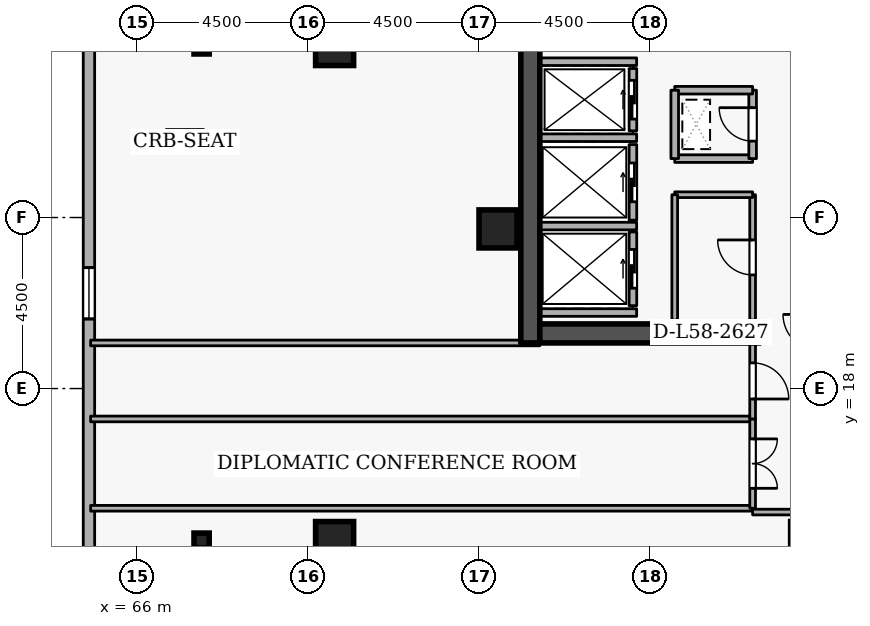
"""IFC4 building model, lengths in metres.
Left out: names, types, materials, properties, quantities, classifications, styles, units other than length and angle.
Written with IfcOpenShell. Run it as: python <this file> out.ifc"""

import sys

from ifc_helpers import new_model, si_unit, direction, frame, frame_2d, origin, origin_2d, place, context, subcontext, project, spatial, rectangle, i_section, extrude, element, fill, save


model = new_model("IFC4")
c1 = context("Model", 3, precision=1e-05, world=origin(), true_north=direction((0.0, 1.0)))
c2 = subcontext(c1, "Body", "Model", "MODEL_VIEW")
j1 = project(units=[si_unit("LENGTHUNIT", "METRE"), si_unit("PLANEANGLEUNIT", "RADIAN")], contexts=[c1])
p1 = place(None, origin())
s1 = spatial("IfcSite", under=j1, at=p1, CompositionType="ELEMENT")
p2 = place(p1, origin())
s2 = spatial("IfcBuilding", under=s1, at=p2, CompositionType="ELEMENT")
p3 = place(p2, frame((0.0, 0.0, 218.1)))
s3 = spatial("IfcBuildingStorey", under=s2, at=p3, CompositionType="ELEMENT", Elevation=218.1)
p4 = place(p3, frame((76.35, 19.2, 0.0), z_axis=(0.0, 0.0, 1.0), x_axis=(0.0, 1.0, 0.0)))
e1 = element("IfcWall", 1, at=p4, inside=s3, PredefinedType="SHEAR", context=c2, shape_type="SweptSolid", body=[
    extrude(rectangle(XDim=15.6, YDim=0.5, at=frame_2d((7.8, 0.0))), origin(), (0.0, 0.0, 1.0), 3.6),
])
p5 = place(p3, frame((76.6, 19.45, 0.0), z_axis=(0.0, 0.0, 1.0), x_axis=(1.0, 0.0, 0.0)))
e2 = element("IfcWall", 2, at=p5, inside=s3, PredefinedType="SHEAR", context=c2, shape_type="SweptSolid", body=[
    extrude(rectangle(XDim=5.8, YDim=0.5, at=frame_2d((2.9, 0.0))), origin(), (0.0, 0.0, 1.0), 3.6),
])
for number, where, z_axis, x_axis in (
    (3, (71.2, 14.0, 0.0), (0.0, 0.0, 1.0), (1.0, 0.0, 0.0)),
    (4, (71.2, 27.0, 0.0), (0.0, 0.0, 1.0), (1.0, 0.0, 0.0)),
    (5, (75.5, 22.2, 0.0), (0.0, 0.0, 1.0), (1.0, 0.0, 0.0)),
):
    element("IfcColumn", number, at=place(p3, frame(where, z_axis=z_axis, x_axis=x_axis)), inside=s3, PredefinedType="COLUMN", context=c2, shape_type="SweptSolid", body=[
        extrude(rectangle(XDim=1.0, YDim=1.0, at=origin_2d()), origin(), (0.0, 0.0, 1.0), 3.6),
    ])
for number, where, z_axis, x_axis in (
    (6, (67.7, 14.0, 0.0), (0.0, 0.0, 1.0), (1.0, 0.0, 0.0)),
    (7, (67.7, 27.0, 0.0), (0.0, 0.0, 1.0), (1.0, 0.0, 0.0)),
):
    element("IfcColumn", number, at=place(p3, frame(where, z_axis=z_axis, x_axis=x_axis)), inside=s3, PredefinedType="COLUMN", context=c2, shape_type="SweptSolid", body=[
        extrude(i_section(OverallWidth=0.399, OverallDepth=0.394, WebThickness=0.023, FlangeThickness=0.037, FilletRadius=0.015, at=origin_2d()), origin(), (0.0, 0.0, 1.0), 3.6),
    ])
p6 = place(p3, frame((64.735, 42.181, 0.0), z_axis=(0.0, 0.0, 1.0), x_axis=(2.7061402e-05, -0.999999999634, 0.0)))
e8 = element("IfcWall", 8, at=p6, inside=s3, PredefinedType="STANDARD", context=c2, shape_type="SweptSolid", body=[
    extrude(rectangle(XDim=36.087, YDim=0.3, at=frame_2d((18.043, 0.0))), origin(), (0.0, 0.0, 1.0), 2.66),
])
p7 = place(p6, frame((1.8, 0.0, 0.72)))
e9 = element("IfcOpeningElement", 9, at=p7, cuts=e8, PredefinedType="OPENING", context=c2, shape_type="SweptSolid", body=[
    extrude(rectangle(XDim=1.35, YDim=1.05, at=frame_2d((0.675, 0.525))), frame((0.0, 0.16, 0.0), z_axis=(0.0, -1.0, 0.0), x_axis=(1.0, 0.0, 0.0)), (0.0, 0.0, 1.0), 0.32),
])
p8 = place(p6, frame((6.6, 0.0, 0.72)))
e10 = element("IfcOpeningElement", 10, at=p8, cuts=e8, PredefinedType="OPENING", context=c2, shape_type="SweptSolid", body=[
    extrude(rectangle(XDim=1.35, YDim=1.05, at=frame_2d((0.675, 0.525))), frame((0.0, 0.16, 0.0), z_axis=(0.0, -1.0, 0.0), x_axis=(1.0, 0.0, 0.0)), (0.0, 0.0, 1.0), 0.32),
])
p9 = place(p6, frame((21.0, 0.0, 0.72)))
e11 = element("IfcOpeningElement", 11, at=p9, cuts=e8, PredefinedType="OPENING", context=c2, shape_type="SweptSolid", body=[
    extrude(rectangle(XDim=1.35, YDim=1.05, at=frame_2d((0.675, 0.525))), frame((0.0, 0.16, 0.0), z_axis=(0.0, -1.0, 0.0), x_axis=(1.0, 0.0, 0.0)), (0.0, 0.0, 1.0), 0.32),
])
p10 = place(p6, frame((30.6, 0.0, 0.72)))
e12 = element("IfcOpeningElement", 12, at=p10, cuts=e8, PredefinedType="OPENING", context=c2, shape_type="SweptSolid", body=[
    extrude(rectangle(XDim=1.35, YDim=1.05, at=frame_2d((0.675, 0.525))), frame((0.0, 0.16, 0.0), z_axis=(0.0, -1.0, 0.0), x_axis=(1.0, 0.0, 0.0)), (0.0, 0.0, 1.0), 0.32),
])
p11 = place(p3, frame((79.05, 24.78, 0.0), z_axis=(0.0, 0.0, 1.0), x_axis=(0.0, 1.0, 0.0)))
e13 = element("IfcWall", 13, at=p11, inside=s3, PredefinedType="STANDARD", context=c2, shape_type="SweptSolid", body=[
    extrude(rectangle(XDim=1.64, YDim=0.2, at=frame_2d((0.82, 0.0))), origin(), (0.0, 0.0, 1.0), 3.26),
])
p12 = place(p11, frame((0.31, 0.0, 0.0)))
e14 = element("IfcOpeningElement", 14, at=p12, cuts=e13, PredefinedType="OPENING", context=c2, shape_type="SweptSolid", body=[
    extrude(rectangle(XDim=1.02, YDim=2.06, at=frame_2d((0.51, 1.03))), frame((0.0, 0.11, 0.0), z_axis=(0.0, -1.0, 0.0), x_axis=(1.0, 0.0, 0.0)), (0.0, 0.0, 1.0), 0.22),
])
p13 = place(p3, frame((79.05, 22.43, 0.0), z_axis=(0.0, 0.0, 1.0), x_axis=(0.0, 1.0, 0.0)))
e15 = element("IfcWall", 15, at=p13, inside=s3, PredefinedType="STANDARD", context=c2, shape_type="SweptSolid", body=[
    extrude(rectangle(XDim=1.99, YDim=0.2, at=frame_2d((0.995, 0.0))), origin(), (0.0, 0.0, 1.0), 3.26),
])
p14 = place(p13, frame((0.485, 0.0, 0.0)))
e16 = element("IfcOpeningElement", 16, at=p14, cuts=e15, PredefinedType="OPENING", context=c2, shape_type="SweptSolid", body=[
    extrude(rectangle(XDim=1.02, YDim=2.06, at=frame_2d((0.51, 1.03))), frame((0.0, 0.11, 0.0), z_axis=(0.0, -1.0, 0.0), x_axis=(1.0, 0.0, 0.0)), (0.0, 0.0, 1.0), 0.22),
])
p15 = place(p3, frame((79.05, 20.18, 0.0), z_axis=(0.0, 0.0, 1.0), x_axis=(0.0, 1.0, 0.0)))
e17 = element("IfcWall", 17, at=p15, inside=s3, PredefinedType="STANDARD", context=c2, shape_type="SweptSolid", body=[
    extrude(rectangle(XDim=1.94, YDim=0.2, at=frame_2d((0.97, 0.0))), origin(), (0.0, 0.0, 1.0), 3.26),
])
p16 = place(p15, frame((0.46, 0.0, 0.0)))
e18 = element("IfcOpeningElement", 18, at=p16, cuts=e17, PredefinedType="OPENING", context=c2, shape_type="SweptSolid", body=[
    extrude(rectangle(XDim=1.02, YDim=2.06, at=frame_2d((0.51, 1.03))), frame((0.0, 0.11, 0.0), z_axis=(0.0, -1.0, 0.0), x_axis=(1.0, 0.0, 0.0)), (0.0, 0.0, 1.0), 0.22),
])
for number, where, z_axis, x_axis in (
    (19, (76.612, 26.6, 0.0), (0.0, 0.0, 1.0), (1.0, 0.0, 0.0)),
    (20, (76.612, 24.6, 0.0), (0.0, 0.0, 1.0), (1.0, 0.0, 0.0)),
    (21, (76.612, 22.275, 0.0), (0.0, 0.0, 1.0), (1.0, 0.0, 0.0)),
    (22, (76.612, 20.0, 0.0), (0.0, 0.0, 1.0), (1.0, 0.0, 0.0)),
):
    element("IfcWall", number, at=place(p3, frame(where, z_axis=z_axis, x_axis=x_axis)), inside=s3, PredefinedType="STANDARD", context=c2, shape_type="SweptSolid", body=[
        extrude(rectangle(XDim=2.536, YDim=0.2, at=frame_2d((1.268, 0.0))), origin(), (0.0, 0.0, 1.0), 3.26),
    ])
p17 = place(p3, frame((80.15, 24.05, 0.0), z_axis=(0.0, 0.0, 1.0), x_axis=(1.0, 0.0, 0.0)))
e23 = element("IfcWall", 23, at=p17, inside=s3, PredefinedType="STANDARD", context=c2, shape_type="SweptSolid", body=[
    extrude(rectangle(XDim=2.05, YDim=0.2, at=frame_2d((1.025, 0.0))), origin(), (0.0, 0.0, 1.0), 3.26),
])
p18 = place(p3, frame((82.2, 24.05, 0.0), z_axis=(0.0, 0.0, 1.0), x_axis=(0.0, 1.0, 0.0)))
e24 = element("IfcWall", 24, at=p18, inside=s3, PredefinedType="STANDARD", context=c2, shape_type="SweptSolid", body=[
    extrude(rectangle(XDim=1.8, YDim=0.2, at=frame_2d((0.9, 0.0))), origin(), (0.0, 0.0, 1.0), 3.26),
])
p19 = place(p18, frame((0.46, 0.0, 0.0)))
e25 = element("IfcOpeningElement", 25, at=p19, cuts=e24, PredefinedType="OPENING", context=c2, shape_type="SweptSolid", body=[
    extrude(rectangle(XDim=0.88, YDim=2.04, at=frame_2d((0.44, 1.02))), frame((0.0, 0.11, 0.0), z_axis=(0.0, -1.0, 0.0), x_axis=(1.0, 0.0, 0.0)), (0.0, 0.0, 1.0), 0.22),
])
p20 = place(p3, frame((82.2, 25.85, 0.0), z_axis=(0.0, 0.0, 1.0), x_axis=(-1.0, 0.0, 0.0)))
e26 = element("IfcWall", 26, at=p20, inside=s3, PredefinedType="STANDARD", context=c2, shape_type="SweptSolid", body=[
    extrude(rectangle(XDim=2.05, YDim=0.2, at=frame_2d((1.025, 0.0))), origin(), (0.0, 0.0, 1.0), 3.26),
])
p21 = place(p3, frame((80.15, 25.85, 0.0), z_axis=(0.0, 0.0, 1.0), x_axis=(0.0, -1.0, 0.0)))
e27 = element("IfcWall", 27, at=p21, inside=s3, PredefinedType="STANDARD", context=c2, shape_type="SweptSolid", body=[
    extrude(rectangle(XDim=1.8, YDim=0.2, at=frame_2d((0.9, 0.0))), origin(), (0.0, 0.0, 1.0), 3.26),
])
p22 = place(p3, frame((82.2, 19.8, 0.0), z_axis=(0.0, 0.0, 1.0), x_axis=(0.0, 1.0, 0.0)))
e28 = element("IfcWall", 28, at=p22, inside=s3, PredefinedType="PARTITIONING", context=c2, shape_type="SweptSolid", body=[
    extrude(rectangle(XDim=3.3, YDim=0.15, at=frame_2d((1.65, 0.0))), origin(), (0.0, 0.0, 1.0), 3.26),
])
p23 = place(p22, frame((1.19, 0.0, 0.0)))
e29 = element("IfcOpeningElement", 29, at=p23, cuts=e28, PredefinedType="OPENING", context=c2, shape_type="SweptSolid", body=[
    extrude(rectangle(XDim=0.92, YDim=2.08, at=frame_2d((0.46, 1.04))), frame((0.0, 0.085, 0.0), z_axis=(0.0, -1.0, 0.0), x_axis=(1.0, 0.0, 0.0)), (0.0, 0.0, 1.0), 0.17),
])
p24 = place(p3, frame((82.2, 23.1, 0.0), z_axis=(0.0, 0.0, 1.0), x_axis=(-1.0, 0.0, 0.0)))
e30 = element("IfcWall", 30, at=p24, inside=s3, PredefinedType="PARTITIONING", context=c2, shape_type="SweptSolid", body=[
    extrude(rectangle(XDim=2.05, YDim=0.15, at=frame_2d((1.025, 0.0))), origin(), (0.0, 0.0, 1.0), 3.26),
])
p25 = place(p3, frame((80.15, 23.1, 0.0), z_axis=(0.0, 0.0, 1.0), x_axis=(0.0, -1.0, 0.0)))
e31 = element("IfcWall", 31, at=p25, inside=s3, PredefinedType="PARTITIONING", context=c2, shape_type="SweptSolid", body=[
    extrude(rectangle(XDim=3.3, YDim=0.15, at=frame_2d((1.65, 0.0))), origin(), (0.0, 0.0, 1.0), 3.26),
])
for number, where, z_axis, x_axis in (
    (32, (82.2, 14.85, 0.0), (0.0, 0.0, 1.0), (-1.0, 0.0, 0.0)),
    (33, (64.78, 17.2, 0.0), (0.0, 0.0, 1.0), (1.0, 0.0, 0.0)),
):
    element("IfcWall", number, at=place(p3, frame(where, z_axis=z_axis, x_axis=x_axis)), inside=s3, PredefinedType="PARTITIONING", context=c2, shape_type="SweptSolid", body=[
        extrude(rectangle(XDim=17.42, YDim=0.15, at=frame_2d((8.71, 0.0))), origin(), (0.0, 0.0, 1.0), 3.26),
    ])
p26 = place(p3, frame((82.2, 17.2, 0.0), z_axis=(0.0, 0.0, 1.0), x_axis=(0.0, -1.0, 0.0)))
e34 = element("IfcWall", 34, at=p26, inside=s3, PredefinedType="PARTITIONING", context=c2, shape_type="SweptSolid", body=[
    extrude(rectangle(XDim=2.35, YDim=0.15, at=frame_2d((1.175, 0.0))), origin(), (0.0, 0.0, 1.0), 3.26),
])
p27 = place(p26, frame((0.525, 0.0, 0.0)))
e35 = element("IfcOpeningElement", 35, at=p27, cuts=e34, PredefinedType="OPENING", context=c2, shape_type="SweptSolid", body=[
    extrude(rectangle(XDim=1.3, YDim=2.12, at=frame_2d((0.65, 1.06))), frame((0.0, 0.085, 0.0), z_axis=(0.0, -1.0, 0.0), x_axis=(1.0, 0.0, 0.0)), (0.0, 0.0, 1.0), 0.17),
])
p28 = place(p3, frame((64.78, 19.2, 0.0), z_axis=(0.0, 0.0, 1.0), x_axis=(1.0, 0.0, 0.0)))
e36 = element("IfcWall", 36, at=p28, inside=s3, PredefinedType="PARTITIONING", context=c2, shape_type="SweptSolid", body=[
    extrude(rectangle(XDim=11.82, YDim=0.15, at=frame_2d((5.91, 0.0))), origin(), (0.0, 0.0, 1.0), 2.465),
])
p29 = place(p3, frame((82.2, 19.2, 0.0), z_axis=(0.0, 0.0, 1.0), x_axis=(0.0, -1.0, 0.0)))
e37 = element("IfcWall", 37, at=p29, inside=s3, PredefinedType="PARTITIONING", context=c2, shape_type="SweptSolid", body=[
    extrude(rectangle(XDim=2.0, YDim=0.15, at=frame_2d((1.0, 0.0))), origin(), (0.0, 0.0, 1.0), 3.26),
])
p30 = place(p29, frame((0.525, 0.0, 0.0)))
e38 = element("IfcOpeningElement", 38, at=p30, cuts=e37, PredefinedType="OPENING", context=c2, shape_type="SweptSolid", body=[
    extrude(rectangle(XDim=0.95, YDim=2.1, at=frame_2d((0.475, 1.05))), frame((0.0, 0.085, 0.0), z_axis=(0.0, -1.0, 0.0), x_axis=(1.0, 0.0, 0.0)), (0.0, 0.0, 1.0), 0.17),
])
p31 = place(p3, frame((82.2, 14.75, 0.0), z_axis=(0.0, 0.0, 1.0), x_axis=(1.0, 0.0, 0.0)))
e39 = element("IfcWall", 39, at=p31, inside=s3, PredefinedType="PARTITIONING", context=c2, shape_type="SweptSolid", body=[
    extrude(rectangle(XDim=1.75, YDim=0.15, at=frame_2d((0.875, 0.0))), origin(), (0.0, 0.0, 1.0), 3.26),
])
p32 = place(p9, origin())
e40 = element("IfcWindow", 40, at=p32, inside=s3, PartitioningType="SINGLE_PANEL", PredefinedType="WINDOW", context=c2, shape_type="SweptSolid", body=[
    extrude(rectangle(XDim=1.35, YDim=1.05, at=frame_2d((0.675, 0.525))), frame((0.0, 0.03, 0.0), z_axis=(0.0, -1.0, 0.0), x_axis=(1.0, 0.0, 0.0)), (0.0, 0.0, 1.0), 0.06),
])
fill(e11, e40)
p33 = place(p12, origin())
e41 = element("IfcDoor", 41, at=p33, inside=s3, OperationType="SLIDING_TO_LEFT", PredefinedType="DOOR", context=c2, shape_type="SweptSolid", body=[
    extrude(rectangle(XDim=1.02, YDim=2.06, at=frame_2d((0.51, 1.03))), frame((0.0, 0.025, 0.0), z_axis=(0.0, -1.0, 0.0), x_axis=(1.0, 0.0, 0.0)), (0.0, 0.0, 1.0), 0.05),
])
fill(e14, e41)
p34 = place(p14, origin())
e42 = element("IfcDoor", 42, at=p34, inside=s3, OperationType="SLIDING_TO_LEFT", PredefinedType="DOOR", context=c2, shape_type="SweptSolid", body=[
    extrude(rectangle(XDim=1.02, YDim=2.06, at=frame_2d((0.51, 1.03))), frame((0.0, 0.025, 0.0), z_axis=(0.0, -1.0, 0.0), x_axis=(1.0, 0.0, 0.0)), (0.0, 0.0, 1.0), 0.05),
])
fill(e16, e42)
p35 = place(p16, origin())
e43 = element("IfcDoor", 43, at=p35, inside=s3, OperationType="SLIDING_TO_LEFT", PredefinedType="DOOR", context=c2, shape_type="SweptSolid", body=[
    extrude(rectangle(XDim=1.02, YDim=2.06, at=frame_2d((0.51, 1.03))), frame((0.0, 0.025, 0.0), z_axis=(0.0, -1.0, 0.0), x_axis=(1.0, 0.0, 0.0)), (0.0, 0.0, 1.0), 0.05),
])
fill(e18, e43)
p36 = place(p19, origin())
e44 = element("IfcDoor", 44, at=p36, inside=s3, OperationType="SINGLE_SWING_RIGHT", PredefinedType="DOOR", context=c2, shape_type="SweptSolid", body=[
    extrude(rectangle(XDim=0.88, YDim=2.04, at=frame_2d((0.44, 1.02))), frame((0.0, 0.025, 0.0), z_axis=(0.0, -1.0, 0.0), x_axis=(1.0, 0.0, 0.0)), (0.0, 0.0, 1.0), 0.05),
])
fill(e25, e44)
p37 = place(p23, origin())
e45 = element("IfcDoor", 45, at=p37, inside=s3, OperationType="SINGLE_SWING_RIGHT", PredefinedType="DOOR", context=c2, shape_type="SweptSolid", body=[
    extrude(rectangle(XDim=0.92, YDim=2.08, at=frame_2d((0.46, 1.04))), frame((0.0, 0.025, 0.0), z_axis=(0.0, -1.0, 0.0), x_axis=(1.0, 0.0, 0.0)), (0.0, 0.0, 1.0), 0.05),
])
fill(e29, e45)
p38 = place(p27, origin())
e46 = element("IfcDoor", 46, at=p38, inside=s3, OperationType="DOUBLE_DOOR_SINGLE_SWING", PredefinedType="DOOR", context=c2, shape_type="SweptSolid", body=[
    extrude(rectangle(XDim=1.3, YDim=2.12, at=frame_2d((0.65, 1.06))), frame((0.0, 0.025, 0.0), z_axis=(0.0, -1.0, 0.0), x_axis=(1.0, 0.0, 0.0)), (0.0, 0.0, 1.0), 0.05),
])
fill(e35, e46)
p39 = place(p30, origin())
e47 = element("IfcDoor", 47, at=p39, inside=s3, OperationType="SINGLE_SWING_RIGHT", PredefinedType="DOOR", context=c2, shape_type="SweptSolid", body=[
    extrude(rectangle(XDim=0.95, YDim=2.1, at=frame_2d((0.475, 1.05))), frame((0.0, 0.025, 0.0), z_axis=(0.0, -1.0, 0.0), x_axis=(1.0, 0.0, 0.0)), (0.0, 0.0, 1.0), 0.05),
])
fill(e38, e47)
save(model, sys.argv[1])
